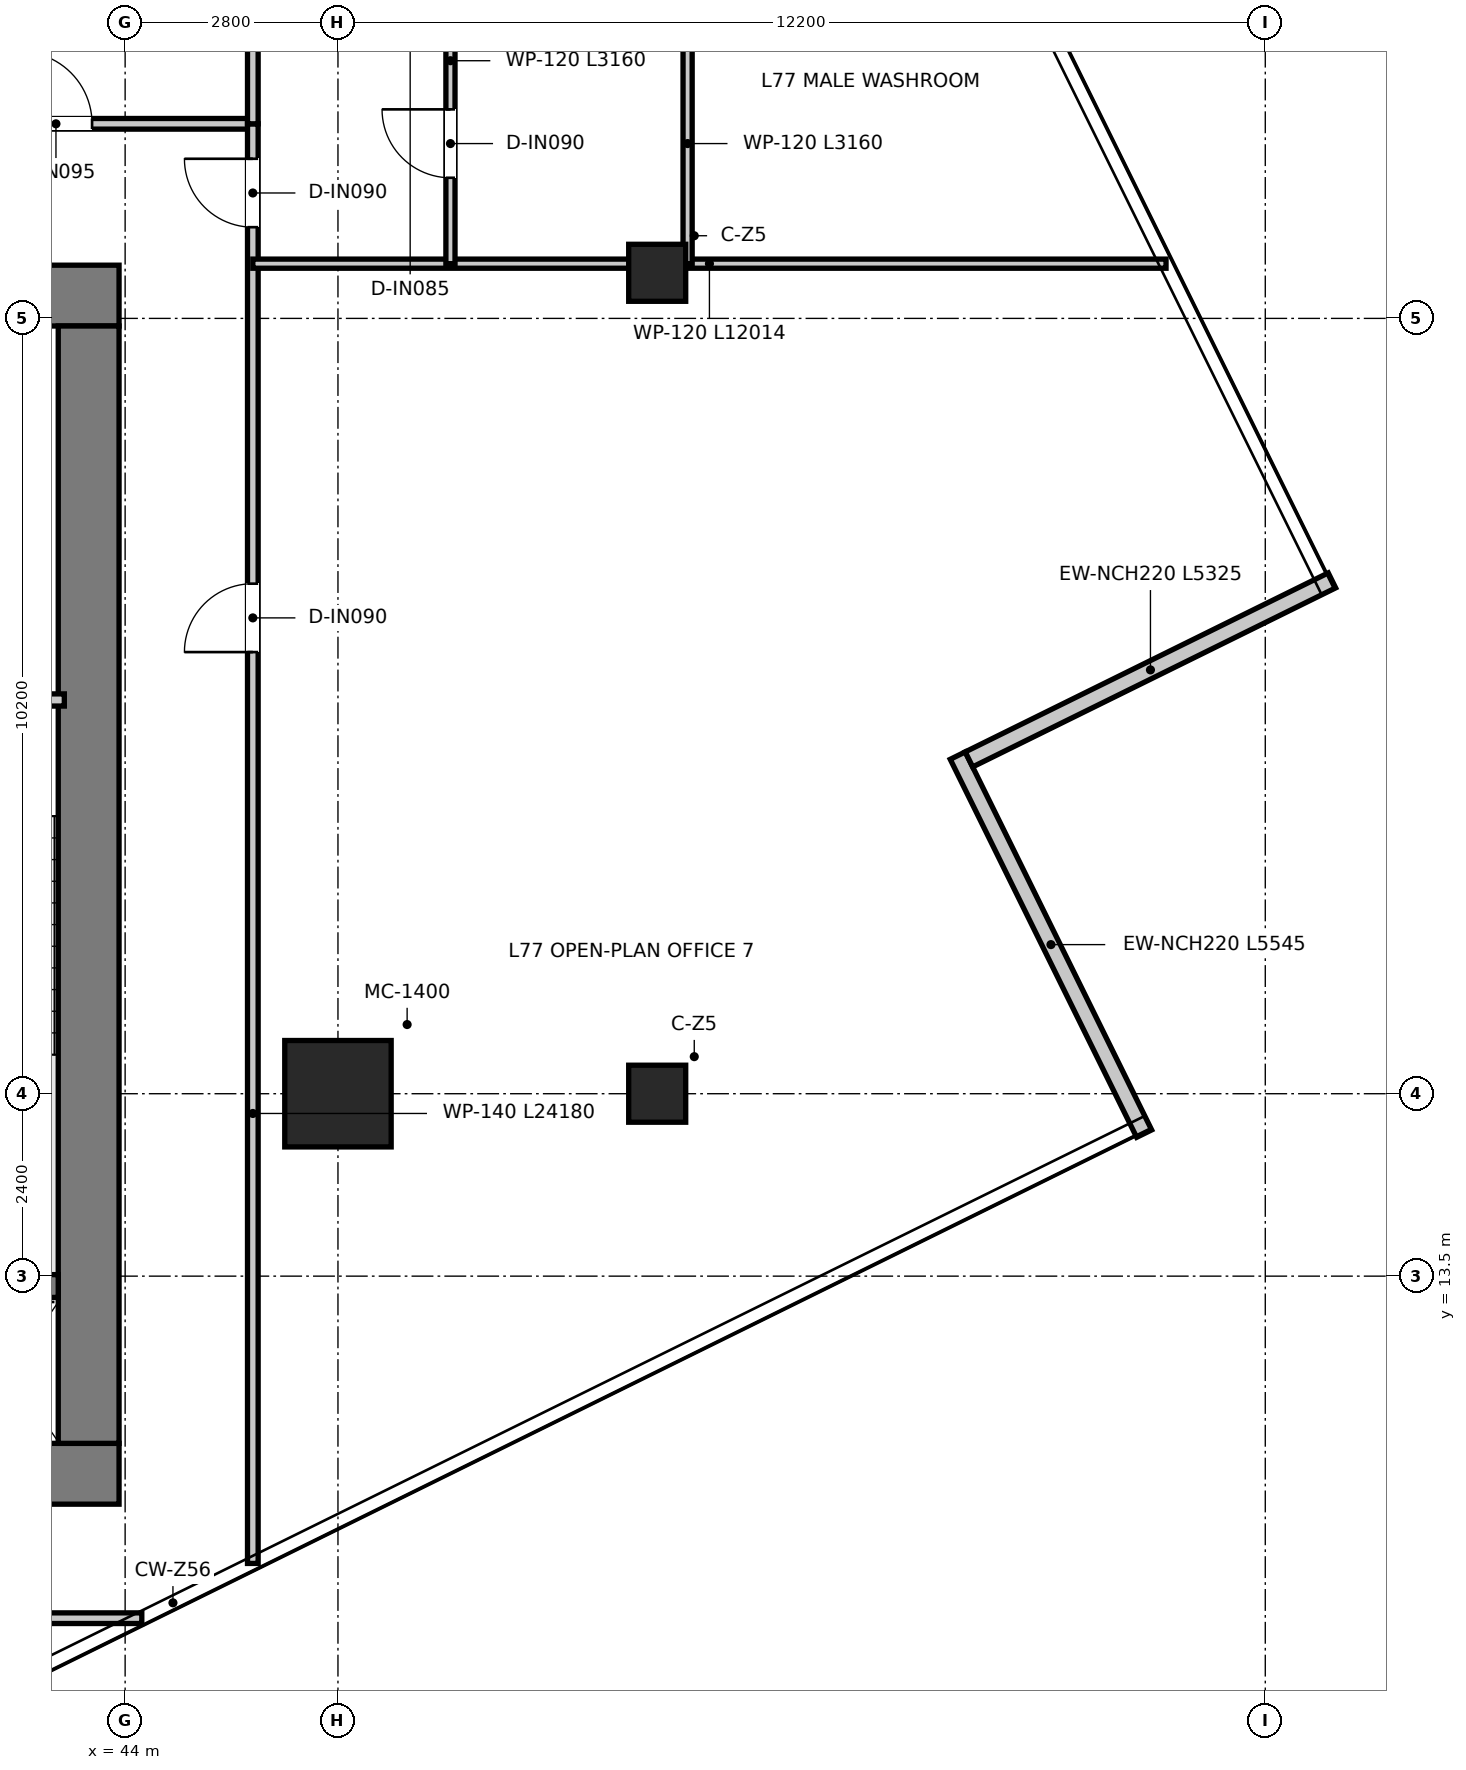
"""IFC4 building model, lengths in metres.
Left out: names, types, materials, properties, quantities, classifications, styles, units other than length and angle.
Written with IfcOpenShell. Run it as: python <this file> out.ifc"""

import sys

from ifc_helpers import new_model, si_unit, direction, frame, frame_2d, origin, origin_2d, place, context, subcontext, project, spatial, rectangle, extrude, source, transform, mapped, element, fill, save


model = new_model("IFC4")
c1 = context("Model", 3, precision=1e-05, world=origin(), true_north=direction((0.0, 1.0)))
c2 = subcontext(c1, "Body", "Model", "MODEL_VIEW")
j1 = project(units=[si_unit("LENGTHUNIT", "METRE"), si_unit("PLANEANGLEUNIT", "RADIAN")], contexts=[c1])
p1 = place(None, origin())
s1 = spatial("IfcSite", under=j1, at=p1, CompositionType="ELEMENT")
p2 = place(p1, origin())
s2 = spatial("IfcBuilding", under=s1, at=p2, CompositionType="ELEMENT")
p3 = place(p2, frame((0.0, 0.0, 314.8)))
s3 = spatial("IfcBuildingStorey", under=s2, at=p3, CompositionType="ELEMENT", Elevation=314.8)
p4 = place(p3, frame((28.08, 10.9, 0.0), z_axis=(0.0, 0.0, 1.0), x_axis=(1.0, 0.0, 0.0)))
e1 = element("IfcWall", 1, at=p4, inside=s3, PredefinedType="SHEAR", context=c2, shape_type="SweptSolid", body=[
    extrude(rectangle(XDim=15.84, YDim=0.8, at=frame_2d((7.92, 0.0))), origin(), (0.0, 0.0, 1.0), 3.95),
])
p5 = place(p3, frame((28.08, 26.4, 0.0), z_axis=(0.0, 0.0, 1.0), x_axis=(1.0, 0.0, 0.0)))
e2 = element("IfcWall", 2, at=p5, inside=s3, PredefinedType="SHEAR", context=c2, shape_type="SweptSolid", body=[
    extrude(rectangle(XDim=15.84, YDim=0.8, at=frame_2d((7.92, 0.0))), origin(), (0.0, 0.0, 1.0), 3.95),
])
p6 = place(p5, frame((7.22, 0.0, 0.0)))
e3 = element("IfcOpeningElement", 3, at=p6, cuts=e2, PredefinedType="OPENING", context=c2, shape_type="SweptSolid", body=[
    extrude(rectangle(XDim=1.4, YDim=2.2, at=frame_2d((0.7, 1.1))), frame((0.0, 0.41, 0.0), z_axis=(0.0, -1.0, 0.0), x_axis=(1.0, 0.0, 0.0)), (0.0, 0.0, 1.0), 0.82),
])
p7 = place(p5, frame((1.775, 0.0, 0.0)))
e4 = element("IfcOpeningElement", 4, at=p7, cuts=e2, PredefinedType="OPENING", context=c2, shape_type="SweptSolid", body=[
    extrude(rectangle(XDim=1.05, YDim=2.1, at=frame_2d((0.525, 1.05))), frame((0.0, 0.41, 0.0), z_axis=(0.0, -1.0, 0.0), x_axis=(1.0, 0.0, 0.0)), (0.0, 0.0, 1.0), 0.82),
])
p8 = place(p5, frame((13.015, 0.0, 0.0)))
e5 = element("IfcOpeningElement", 5, at=p8, cuts=e2, PredefinedType="OPENING", context=c2, shape_type="SweptSolid", body=[
    extrude(rectangle(XDim=1.05, YDim=2.1, at=frame_2d((0.525, 1.05))), frame((0.0, 0.41, 0.0), z_axis=(0.0, -1.0, 0.0), x_axis=(1.0, 0.0, 0.0)), (0.0, 0.0, 1.0), 0.82),
])
p9 = place(p3, frame((43.52, 11.3, 0.0), z_axis=(0.0, 0.0, 1.0), x_axis=(0.0, 1.0, 0.0)))
e6 = element("IfcWall", 6, at=p9, inside=s3, PredefinedType="SHEAR", context=c2, shape_type="SweptSolid", body=[
    extrude(rectangle(XDim=14.7, YDim=0.8, at=frame_2d((7.35, 0.0))), origin(), (0.0, 0.0, 1.0), 3.95),
])
p10 = place(p3, frame((40.02, 13.37, 0.0), z_axis=(0.0, 0.0, 1.0), x_axis=(1.0, 0.0, 0.0)))
e7 = element("IfcWall", 7, at=p10, inside=s3, PredefinedType="SHEAR", context=c2, shape_type="SweptSolid", body=[
    extrude(rectangle(XDim=3.1, YDim=0.3, at=frame_2d((1.55, 0.0))), origin(), (0.0, 0.0, 1.0), 3.95),
])
m1 = source(origin(), c2, "Body", "SweptSolid", [
    extrude(rectangle(XDim=1.4, YDim=1.4, at=origin_2d()), origin(), (0.0, 0.0, 1.0), 3.95),
])
p11 = place(p3, frame((46.8, 15.9, 0.0), z_axis=(0.0, 0.0, 1.0), x_axis=(1.0, 0.0, 0.0)))
e8 = element("IfcColumn", 8, at=p11, inside=s3, PredefinedType="USERDEFINED", context=c2, shape_type="MappedRepresentation", body=[
    mapped(m1, transform((0.0, 0.0, 0.0), x_axis=(1.0, 0.0, 0.0), y_axis=(0.0, 1.0, 0.0), z_axis=(0.0, 0.0, 1.0), scale=1.0)),
])
m2 = source(origin(), c2, "Body", "SweptSolid", [
    extrude(rectangle(XDim=0.75, YDim=0.75, at=origin_2d()), origin(), (0.0, 0.0, 1.0), 3.95),
])
for number, where, z_axis, x_axis in (
    (9, (51.0, 26.7, 0.0), (0.0, 0.0, 1.0), (1.0, 0.0, 0.0)),
    (10, (51.0, 15.9, 0.0), (0.0, 0.0, 1.0), (1.0, 0.0, 0.0)),
):
    element("IfcColumn", number, at=place(p3, frame(where, z_axis=z_axis, x_axis=x_axis)), inside=s3, PredefinedType="COLUMN", context=c2, shape_type="MappedRepresentation", body=[
        mapped(m2, transform((0.0, 0.0, 0.0), x_axis=(1.0, 0.0, 0.0), y_axis=(0.0, 1.0, 0.0), z_axis=(0.0, 0.0, 1.0), scale=1.0)),
    ])
p12 = place(p3, frame((57.406, 15.375, 0.0), z_axis=(0.0, 0.0, 1.0), x_axis=(-0.442275503639, 0.896879244314, 0.0)))
e11 = element("IfcWall", 11, at=p12, inside=s3, PredefinedType="ELEMENTEDWALL", context=c2, shape_type="SweptSolid", body=[
    extrude(rectangle(XDim=5.545, YDim=0.22, at=frame_2d((2.772, 0.0))), origin(), (0.0, 0.0, 1.0), 3.59),
])
p13 = place(p3, frame((55.101, 20.298, 0.0), z_axis=(0.0, 0.0, 1.0), x_axis=(0.896871119712, 0.442291978932, 0.0)))
e12 = element("IfcWall", 12, at=p13, inside=s3, PredefinedType="ELEMENTEDWALL", context=c2, shape_type="SweptSolid", body=[
    extrude(rectangle(XDim=5.325, YDim=0.22, at=frame_2d((2.663, 0.0))), origin(), (0.0, 0.0, 1.0), 3.59),
])
p14 = place(p3, frame((40.04, 21.08, 0.0), z_axis=(0.0, 0.0, 1.0), x_axis=(1.0, 0.0, 0.0)))
e13 = element("IfcWall", 13, at=p14, inside=s3, PredefinedType="PARTITIONING", context=c2, shape_type="SweptSolid", body=[
    extrude(rectangle(XDim=3.16, YDim=0.16, at=frame_2d((1.58, 0.0))), origin(), (0.0, 0.0, 1.0), 3.59),
])
p15 = place(p14, frame((1.055, 0.0, 0.0)))
e14 = element("IfcOpeningElement", 14, at=p15, cuts=e13, PredefinedType="OPENING", context=c2, shape_type="SweptSolid", body=[
    extrude(rectangle(XDim=1.05, YDim=2.1, at=frame_2d((0.525, 1.05))), frame((0.0, 0.09, 0.0), z_axis=(0.0, -1.0, 0.0), x_axis=(1.0, 0.0, 0.0)), (0.0, 0.0, 1.0), 0.18),
])
p16 = place(p3, frame((26.32, 28.66, 0.0), z_axis=(0.0, 0.0, 1.0), x_axis=(1.0, 0.0, 0.0)))
e15 = element("IfcWall", 15, at=p16, inside=s3, PredefinedType="PARTITIONING", context=c2, shape_type="SweptSolid", body=[
    extrude(rectangle(XDim=19.36, YDim=0.14, at=frame_2d((9.68, 0.0))), origin(), (0.0, 0.0, 1.0), 3.1),
])
p17 = place(p16, frame((2.865, 0.0, 0.0)))
e16 = element("IfcOpeningElement", 16, at=p17, cuts=e15, PredefinedType="OPENING", context=c2, shape_type="SweptSolid", body=[
    extrude(rectangle(XDim=0.95, YDim=2.1, at=frame_2d((0.475, 1.05))), frame((0.0, 0.08, 0.0), z_axis=(0.0, -1.0, 0.0), x_axis=(1.0, 0.0, 0.0)), (0.0, 0.0, 1.0), 0.16),
])
p18 = place(p16, frame((9.955, 0.0, 0.0)))
e17 = element("IfcOpeningElement", 17, at=p18, cuts=e15, PredefinedType="OPENING", context=c2, shape_type="SweptSolid", body=[
    extrude(rectangle(XDim=0.95, YDim=2.1, at=frame_2d((0.475, 1.05))), frame((0.0, 0.08, 0.0), z_axis=(0.0, -1.0, 0.0), x_axis=(1.0, 0.0, 0.0)), (0.0, 0.0, 1.0), 0.16),
])
p19 = place(p16, frame((16.295, 0.0, 0.0)))
e18 = element("IfcOpeningElement", 18, at=p19, cuts=e15, PredefinedType="OPENING", context=c2, shape_type="SweptSolid", body=[
    extrude(rectangle(XDim=0.95, YDim=2.1, at=frame_2d((0.475, 1.05))), frame((0.0, 0.08, 0.0), z_axis=(0.0, -1.0, 0.0), x_axis=(1.0, 0.0, 0.0)), (0.0, 0.0, 1.0), 0.16),
])
p20 = place(p3, frame((45.68, 9.72, 0.0), z_axis=(0.0, 0.0, 1.0), x_axis=(0.0, 1.0, 0.0)))
e19 = element("IfcWall", 19, at=p20, inside=s3, PredefinedType="PARTITIONING", context=c2, shape_type="SweptSolid", body=[
    extrude(rectangle(XDim=18.94, YDim=0.14, at=frame_2d((9.47, 0.0))), origin(), (0.0, 0.0, 1.0), 3.05),
])
p21 = place(p20, frame((17.58, 0.0, 0.0)))
e20 = element("IfcOpeningElement", 20, at=p21, cuts=e19, PredefinedType="OPENING", context=c2, shape_type="SweptSolid", body=[
    extrude(rectangle(XDim=0.9, YDim=2.1, at=frame_2d((0.45, 1.05))), frame((0.0, 0.08, 0.0), z_axis=(0.0, -1.0, 0.0), x_axis=(1.0, 0.0, 0.0)), (0.0, 0.0, 1.0), 0.16),
])
p22 = place(p20, frame((11.99, 0.0, 0.0)))
e21 = element("IfcOpeningElement", 21, at=p22, cuts=e19, PredefinedType="OPENING", context=c2, shape_type="SweptSolid", body=[
    extrude(rectangle(XDim=0.9, YDim=2.1, at=frame_2d((0.45, 1.05))), frame((0.0, 0.08, 0.0), z_axis=(0.0, -1.0, 0.0), x_axis=(1.0, 0.0, 0.0)), (0.0, 0.0, 1.0), 0.16),
])
p23 = place(p3, frame((22.975, 9.0, 0.0), z_axis=(0.0, 0.0, 1.0), x_axis=(1.0, 0.0, 0.0)))
e22 = element("IfcWall", 22, at=p23, inside=s3, PredefinedType="PARTITIONING", context=c2, shape_type="SweptSolid", body=[
    extrude(rectangle(XDim=21.244, YDim=0.14, at=frame_2d((10.622, 0.0))), origin(), (0.0, 0.0, 1.0), 3.59),
])
p24 = place(p23, frame((8.6, 0.0, 0.0)))
e23 = element("IfcOpeningElement", 23, at=p24, cuts=e22, PredefinedType="OPENING", context=c2, shape_type="SweptSolid", body=[
    extrude(rectangle(XDim=0.85, YDim=2.1, at=frame_2d((0.425, 1.05))), frame((0.0, 0.08, 0.0), z_axis=(0.0, -1.0, 0.0), x_axis=(1.0, 0.0, 0.0)), (0.0, 0.0, 1.0), 0.16),
])
p25 = place(p23, frame((16.6, 0.0, 0.0)))
e24 = element("IfcOpeningElement", 24, at=p25, cuts=e22, PredefinedType="OPENING", context=c2, shape_type="SweptSolid", body=[
    extrude(rectangle(XDim=0.85, YDim=2.1, at=frame_2d((0.425, 1.05))), frame((0.0, 0.08, 0.0), z_axis=(0.0, -1.0, 0.0), x_axis=(1.0, 0.0, 0.0)), (0.0, 0.0, 1.0), 0.16),
])
p26 = place(p3, frame((45.68, 26.82, 0.0), z_axis=(0.0, 0.0, 1.0), x_axis=(1.0, 0.0, 0.0)))
e25 = element("IfcWall", 25, at=p26, inside=s3, PredefinedType="PARTITIONING", context=c2, shape_type="SweptSolid", body=[
    extrude(rectangle(XDim=12.014, YDim=0.12, at=frame_2d((6.007, 0.0))), origin(), (0.0, 0.0, 1.0), 3.05),
])
p27 = place(p3, frame((51.4, 26.82, 0.0), z_axis=(0.0, 0.0, 1.0), x_axis=(0.0, 1.0, 0.0)))
e26 = element("IfcWall", 26, at=p27, inside=s3, PredefinedType="PARTITIONING", context=c2, shape_type="SweptSolid", body=[
    extrude(rectangle(XDim=3.16, YDim=0.12, at=frame_2d((1.58, 0.0))), origin(), (0.0, 0.0, 1.0), 3.59),
])
p28 = place(p3, frame((48.28, 26.82, 0.0), z_axis=(0.0, 0.0, 1.0), x_axis=(0.0, 1.0, 0.0)))
e27 = element("IfcWall", 27, at=p28, inside=s3, PredefinedType="PARTITIONING", context=c2, shape_type="SweptSolid", body=[
    extrude(rectangle(XDim=3.16, YDim=0.12, at=frame_2d((1.58, 0.0))), origin(), (0.0, 0.0, 1.0), 3.1),
])
p29 = place(p28, frame((1.13, 0.0, 0.0)))
e28 = element("IfcOpeningElement", 28, at=p29, cuts=e27, PredefinedType="OPENING", context=c2, shape_type="SweptSolid", body=[
    extrude(rectangle(XDim=0.9, YDim=2.1, at=frame_2d((0.45, 1.05))), frame((0.0, 0.07, 0.0), z_axis=(0.0, -1.0, 0.0), x_axis=(1.0, 0.0, 0.0)), (0.0, 0.0, 1.0), 0.14),
])
p30 = place(p3, frame((45.68, 28.66, 0.0), z_axis=(0.0, 0.0, 1.0), x_axis=(0.0, 1.0, 0.0)))
e29 = element("IfcWall", 29, at=p30, inside=s3, PredefinedType="PARTITIONING", context=c2, shape_type="SweptSolid", body=[
    extrude(rectangle(XDim=5.24, YDim=0.14, at=frame_2d((2.62, 0.0))), origin(), (0.0, 0.0, 1.0), 3.35),
])
p31 = place(p21, origin())
e30 = element("IfcDoor", 30, at=p31, inside=s3, OperationType="SINGLE_SWING_RIGHT", PredefinedType="DOOR", context=c2, shape_type="SweptSolid", body=[
    extrude(rectangle(XDim=0.9, YDim=2.1, at=frame_2d((0.45, 1.05))), frame((0.0, 0.025, 0.0), z_axis=(0.0, -1.0, 0.0), x_axis=(1.0, 0.0, 0.0)), (0.0, 0.0, 1.0), 0.05),
])
fill(e20, e30)
p32 = place(p29, origin())
e31 = element("IfcDoor", 31, at=p32, inside=s3, OperationType="SINGLE_SWING_RIGHT", PredefinedType="DOOR", context=c2, shape_type="SweptSolid", body=[
    extrude(rectangle(XDim=0.9, YDim=2.1, at=frame_2d((0.45, 1.05))), frame((0.0, 0.025, 0.0), z_axis=(0.0, -1.0, 0.0), x_axis=(1.0, 0.0, 0.0)), (0.0, 0.0, 1.0), 0.05),
])
fill(e28, e31)
p33 = place(p19, origin())
e32 = element("IfcDoor", 32, at=p33, inside=s3, OperationType="SINGLE_SWING_LEFT", PredefinedType="DOOR", context=c2, shape_type="SweptSolid", body=[
    extrude(rectangle(XDim=0.95, YDim=2.1, at=frame_2d((0.475, 1.05))), frame((0.0, 0.025, 0.0), z_axis=(0.0, -1.0, 0.0), x_axis=(1.0, 0.0, 0.0)), (0.0, 0.0, 1.0), 0.05),
])
fill(e18, e32)
p34 = place(p22, origin())
e33 = element("IfcDoor", 33, at=p34, inside=s3, OperationType="SINGLE_SWING_LEFT", PredefinedType="DOOR", context=c2, shape_type="SweptSolid", body=[
    extrude(rectangle(XDim=0.9, YDim=2.1, at=frame_2d((0.45, 1.05))), frame((0.0, 0.025, 0.0), z_axis=(0.0, -1.0, 0.0), x_axis=(1.0, 0.0, 0.0)), (0.0, 0.0, 1.0), 0.05),
])
fill(e21, e33)
save(model, sys.argv[1])
